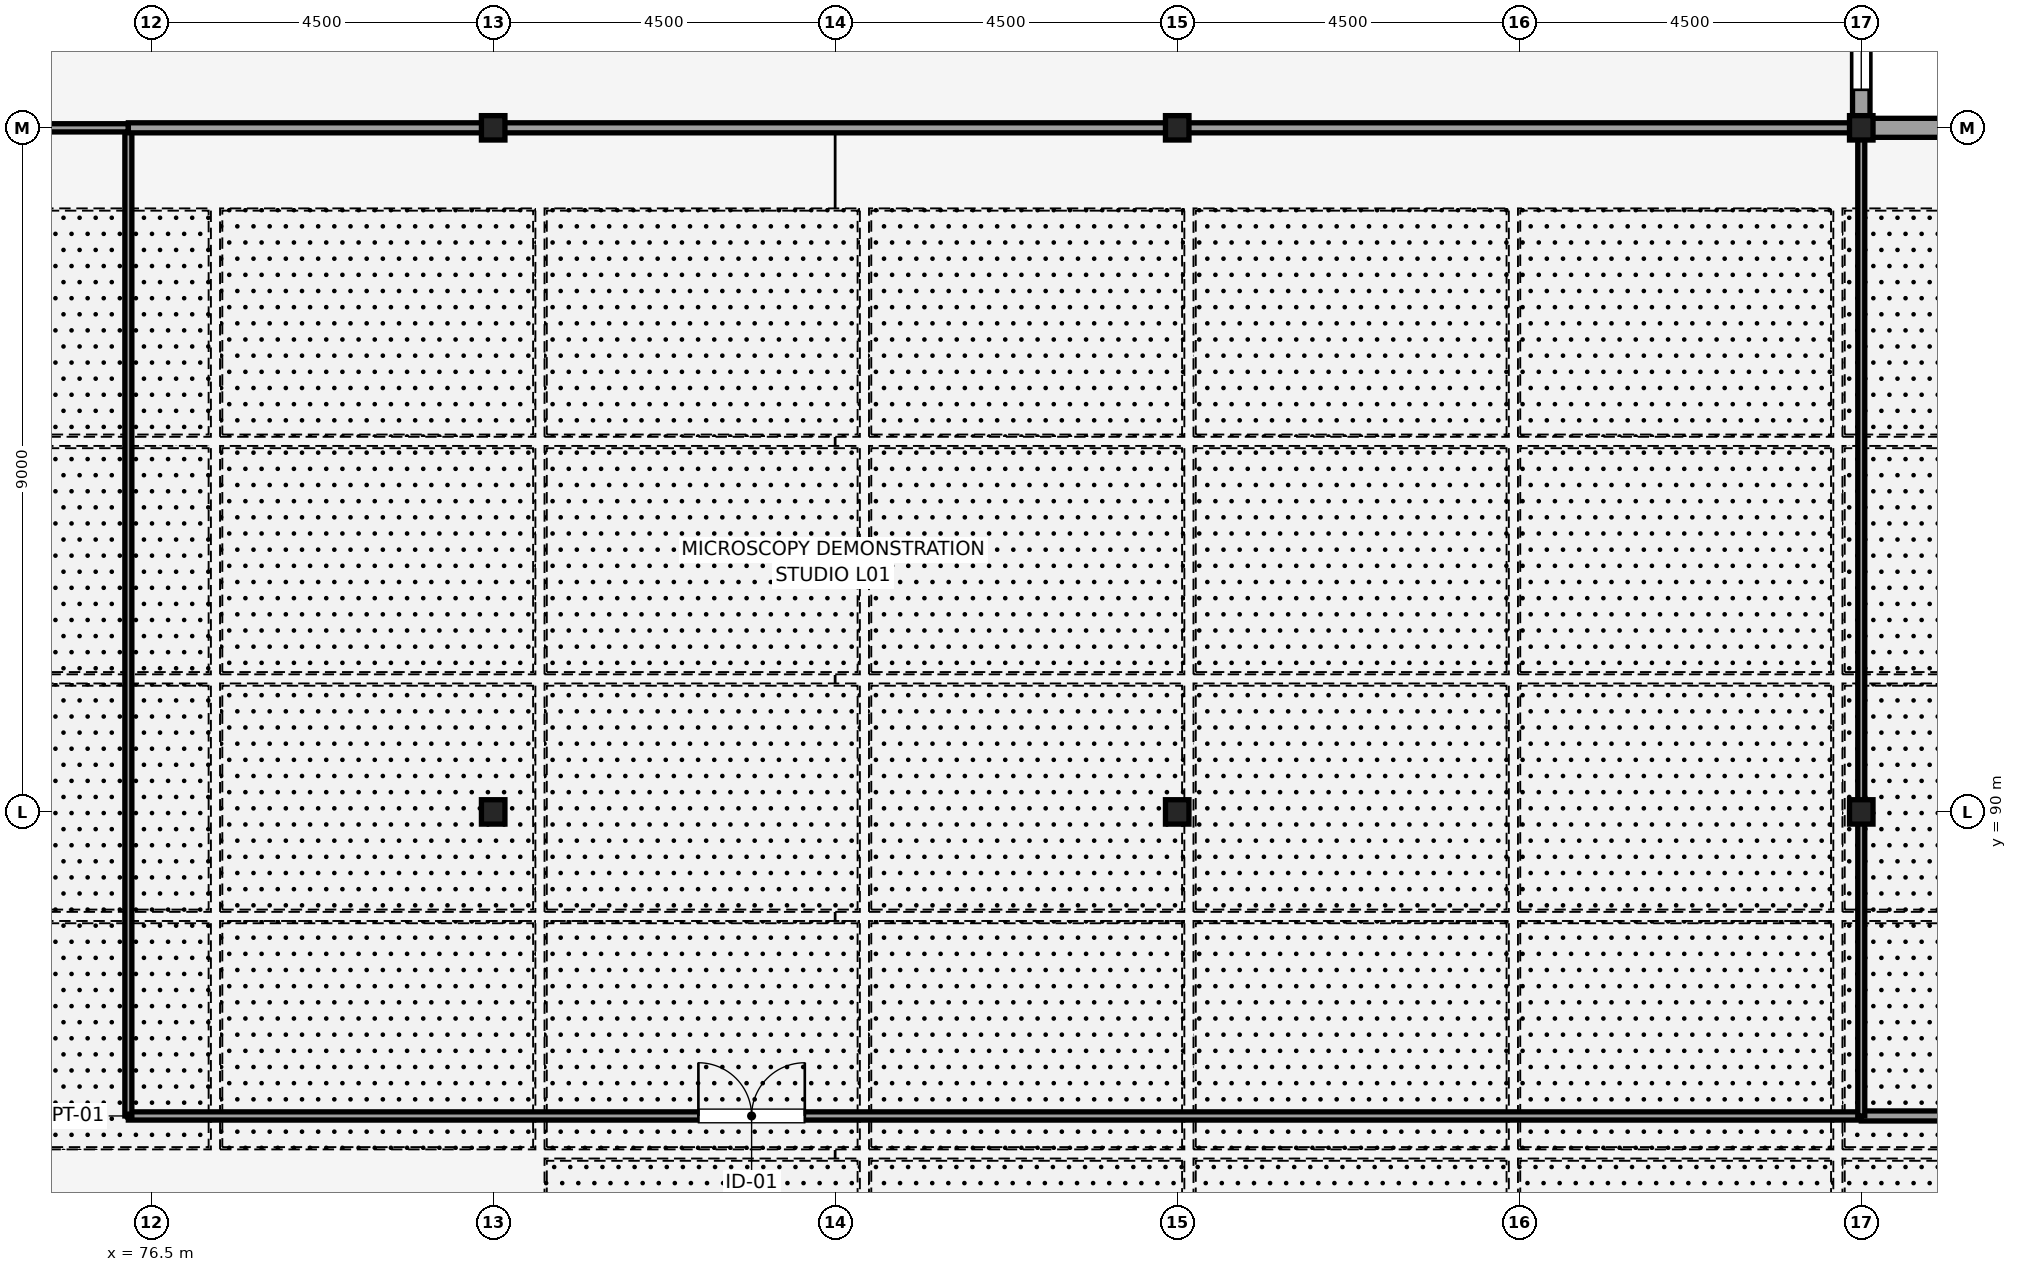
"""IFC4 building model, lengths in metres.
Left out: names, types, materials, properties, quantities, classifications, styles, units other than length and angle.
Written with IfcOpenShell. Run it as: python <this file> out.ifc"""

import sys

from ifc_helpers import new_model, si_unit, direction, frame, frame_2d, origin, origin_2d, place, context, subcontext, project, spatial, rectangle, i_section, extrude, element, fill, save


model = new_model("IFC4")
c1 = context("Model", 3, precision=1e-05, world=origin(), true_north=direction((0.0, 1.0)))
c2 = subcontext(c1, "Body", "Model", "MODEL_VIEW")
j1 = project(units=[si_unit("LENGTHUNIT", "METRE"), si_unit("PLANEANGLEUNIT", "RADIAN")], contexts=[c1])
p1 = place(None, origin())
s1 = spatial("IfcSite", under=j1, at=p1, CompositionType="ELEMENT")
p2 = place(p1, origin())
s2 = spatial("IfcBuilding", under=s1, at=p2, CompositionType="ELEMENT")
p3 = place(p2, frame((0.0, 0.0, 5.4)))
s3 = spatial("IfcBuildingStorey", under=s2, at=p3, CompositionType="ELEMENT", Elevation=5.4)
for number, where, z_axis, x_axis in (
    (1, (81.0, 90.0, 0.0), (0.0, 0.0, 1.0), (1.0, 0.0, 0.0)),
    (2, (81.0, 99.0, 0.0), (0.0, 0.0, 1.0), (1.0, 0.0, 0.0)),
    (3, (90.0, 90.0, 0.0), (0.0, 0.0, 1.0), (1.0, 0.0, 0.0)),
    (4, (90.0, 99.0, 0.0), (0.0, 0.0, 1.0), (1.0, 0.0, 0.0)),
    (5, (99.0, 90.0, 0.0), (0.0, 0.0, 1.0), (1.0, 0.0, 0.0)),
    (6, (99.0, 99.0, 0.0), (0.0, 0.0, 1.0), (1.0, 0.0, 0.0)),
):
    element("IfcColumn", number, at=place(p3, frame(where, z_axis=z_axis, x_axis=x_axis)), inside=s3, PredefinedType="COLUMN", context=c2, shape_type="SweptSolid", body=[
        extrude(i_section(OverallWidth=0.309, OverallDepth=0.321, WebThickness=0.014, FlangeThickness=0.022, FilletRadius=0.017, at=origin_2d()), origin(), (0.0, 0.0, 1.0), 4.5),
    ])
p4 = place(p3, frame((99.0, 99.0, 0.0), z_axis=(0.0, 0.0, 1.0), x_axis=(0.0, 1.0, 0.0)))
e7 = element("IfcWall", 7, at=p4, inside=s3, PredefinedType="STANDARD", context=c2, shape_type="SweptSolid", body=[
    extrude(rectangle(XDim=12.6, YDim=0.23, at=frame_2d((6.3, 0.0))), origin(), (0.0, 0.0, 1.0), 3.772),
])
p5 = place(p4, frame((2.0, 0.0, 1.0)))
e8 = element("IfcOpeningElement", 8, at=p5, cuts=e7, PredefinedType="OPENING", context=c2, shape_type="SweptSolid", body=[
    extrude(rectangle(XDim=2.4, YDim=1.5, at=frame_2d((1.2, 0.75))), frame((0.0, 0.125, 0.0), z_axis=(0.0, -1.0, 0.0), x_axis=(1.0, 0.0, 0.0)), (0.0, 0.0, 1.0), 0.25),
])
p6 = place(p4, frame((9.6, 0.0, 1.0)))
e9 = element("IfcOpeningElement", 9, at=p6, cuts=e7, PredefinedType="OPENING", context=c2, shape_type="SweptSolid", body=[
    extrude(rectangle(XDim=1.8, YDim=1.5, at=frame_2d((0.9, 0.75))), frame((0.0, 0.125, 0.0), z_axis=(0.0, -1.0, 0.0), x_axis=(1.0, 0.0, 0.0)), (0.0, 0.0, 1.0), 0.25),
])
p7 = place(p4, frame((5.2, 0.0, 1.0)))
e10 = element("IfcOpeningElement", 10, at=p7, cuts=e7, PredefinedType="OPENING", context=c2, shape_type="SweptSolid", body=[
    extrude(rectangle(XDim=1.2, YDim=1.5, at=frame_2d((0.6, 0.75))), frame((0.0, 0.125, 0.0), z_axis=(0.0, -1.0, 0.0), x_axis=(1.0, 0.0, 0.0)), (0.0, 0.0, 1.0), 0.25),
])
p8 = place(p4, frame((0.5, 0.0, 1.0)))
e11 = element("IfcOpeningElement", 11, at=p8, cuts=e7, PredefinedType="OPENING", context=c2, shape_type="SweptSolid", body=[
    extrude(rectangle(XDim=1.35, YDim=1.45, at=frame_2d((0.675, 0.725))), frame((0.0, 0.125, 0.0), z_axis=(0.0, -1.0, 0.0), x_axis=(1.0, 0.0, 0.0)), (0.0, 0.0, 1.0), 0.25),
])
p9 = place(p3, frame((112.5, 99.0, 0.0), z_axis=(0.0, 0.0, 1.0), x_axis=(-1.0, 0.0, 0.0)))
e12 = element("IfcWall", 12, at=p9, inside=s3, PredefinedType="STANDARD", context=c2, shape_type="SweptSolid", body=[
    extrude(rectangle(XDim=13.5, YDim=0.25, at=frame_2d((6.75, 0.0))), origin(), (0.0, 0.0, 1.0), 3.767),
])
p10 = place(p9, frame((1.35, 0.0, 1.0)))
e13 = element("IfcOpeningElement", 13, at=p10, cuts=e12, PredefinedType="OPENING", context=c2, shape_type="SweptSolid", body=[
    extrude(rectangle(XDim=1.8, YDim=1.5, at=frame_2d((0.9, 0.75))), frame((0.0, 0.135, 0.0), z_axis=(0.0, -1.0, 0.0), x_axis=(1.0, 0.0, 0.0)), (0.0, 0.0, 1.0), 0.27),
])
p11 = place(p9, frame((9.6, 0.0, 1.0)))
e14 = element("IfcOpeningElement", 14, at=p11, cuts=e12, PredefinedType="OPENING", context=c2, shape_type="SweptSolid", body=[
    extrude(rectangle(XDim=1.8, YDim=1.5, at=frame_2d((0.9, 0.75))), frame((0.0, 0.135, 0.0), z_axis=(0.0, -1.0, 0.0), x_axis=(1.0, 0.0, 0.0)), (0.0, 0.0, 1.0), 0.27),
])
p12 = place(p9, frame((5.6, 0.0, 0.6)))
e15 = element("IfcOpeningElement", 15, at=p12, cuts=e12, PredefinedType="OPENING", context=c2, shape_type="SweptSolid", body=[
    extrude(rectangle(XDim=3.0, YDim=2.4, at=frame_2d((1.5, 1.2))), frame((0.0, 0.135, 0.0), z_axis=(0.0, -1.0, 0.0), x_axis=(1.0, 0.0, 0.0)), (0.0, 0.0, 1.0), 0.27),
])
p13 = place(p3, frame((76.2, 86.0, 0.0), z_axis=(0.0, 0.0, 1.0), x_axis=(1.0, 0.0, 0.0)))
e16 = element("IfcWall", 16, at=p13, inside=s3, PredefinedType="PARTITIONING", context=c2, shape_type="SweptSolid", body=[
    extrude(rectangle(XDim=22.8, YDim=0.108, at=frame_2d((11.4, 0.0))), origin(), (0.0, 0.0, 1.0), 4.32),
])
p14 = place(p13, frame((7.5, 0.0, 0.0)))
e17 = element("IfcOpeningElement", 17, at=p14, cuts=e16, PredefinedType="OPENING", context=c2, shape_type="SweptSolid", body=[
    extrude(rectangle(XDim=1.4, YDim=2.2, at=frame_2d((0.7, 1.1))), frame((0.0, 0.064, 0.0), z_axis=(0.0, -1.0, 0.0), x_axis=(1.0, 0.0, 0.0)), (0.0, 0.0, 1.0), 0.128),
])
p15 = place(p3, frame((99.0, 86.0, 0.0), z_axis=(0.0, 0.0, 1.0), x_axis=(1.0, 0.0, 0.0)))
e18 = element("IfcWall", 18, at=p15, inside=s3, PredefinedType="PARTITIONING", context=c2, shape_type="SweptSolid", body=[
    extrude(rectangle(XDim=13.5, YDim=0.132, at=frame_2d((6.75, 0.0))), origin(), (0.0, 0.0, 1.0), 4.32),
])
p16 = place(p15, frame((5.2, 0.0, 0.0)))
e19 = element("IfcOpeningElement", 19, at=p16, cuts=e18, PredefinedType="OPENING", context=c2, shape_type="SweptSolid", body=[
    extrude(rectangle(XDim=0.95, YDim=2.15, at=frame_2d((0.475, 1.075))), frame((0.0, 0.076, 0.0), z_axis=(0.0, -1.0, 0.0), x_axis=(1.0, 0.0, 0.0)), (0.0, 0.0, 1.0), 0.152),
])
p17 = place(p3, frame((76.2, 86.0, 0.0), z_axis=(0.0, 0.0, 1.0), x_axis=(0.0, 1.0, 0.0)))
e20 = element("IfcWall", 20, at=p17, inside=s3, PredefinedType="PARTITIONING", context=c2, shape_type="SweptSolid", body=[
    extrude(rectangle(XDim=13.0, YDim=0.092, at=frame_2d((6.5, 0.0))), origin(), (0.0, 0.0, 1.0), 4.32),
])
p18 = place(p3, frame((99.0, 86.0, 0.0), z_axis=(0.0, 0.0, 1.0), x_axis=(0.0, 1.0, 0.0)))
e21 = element("IfcWall", 21, at=p18, inside=s3, PredefinedType="PARTITIONING", context=c2, shape_type="SweptSolid", body=[
    extrude(rectangle(XDim=13.0, YDim=0.092, at=frame_2d((6.5, 0.0))), origin(), (0.0, 0.0, 1.0), 3.772),
])
p19 = place(p3, frame((72.0, 99.0, 0.0), z_axis=(0.0, 0.0, 1.0), x_axis=(1.0, 0.0, 0.0)))
e22 = element("IfcWall", 22, at=p19, inside=s3, PredefinedType="PARTITIONING", context=c2, shape_type="SweptSolid", body=[
    extrude(rectangle(XDim=4.2, YDim=0.108, at=frame_2d((2.1, 0.0))), origin(), (0.0, 0.0, 1.0), 3.767),
])
p20 = place(p19, frame((1.1, 0.0, 0.0)))
e23 = element("IfcOpeningElement", 23, at=p20, cuts=e22, PredefinedType="OPENING", context=c2, shape_type="SweptSolid", body=[
    extrude(rectangle(XDim=2.0, YDim=2.4, at=frame_2d((1.0, 1.2))), frame((0.0, 0.064, 0.0), z_axis=(0.0, -1.0, 0.0), x_axis=(1.0, 0.0, 0.0)), (0.0, 0.0, 1.0), 0.128),
])
p21 = place(p3, frame((76.2, 99.0, 0.0), z_axis=(0.0, 0.0, 1.0), x_axis=(1.0, 0.0, 0.0)))
e24 = element("IfcWall", 24, at=p21, inside=s3, PredefinedType="PARTITIONING", context=c2, shape_type="SweptSolid", body=[
    extrude(rectangle(XDim=22.8, YDim=0.132, at=frame_2d((11.4, 0.0))), origin(), (0.0, 0.0, 1.0), 3.767),
])
p22 = place(p8, origin())
e25 = element("IfcWindow", 25, at=p22, inside=s3, PartitioningType="SINGLE_PANEL", PredefinedType="WINDOW", context=c2, shape_type="SweptSolid", body=[
    extrude(rectangle(XDim=1.35, YDim=1.45, at=frame_2d((0.675, 0.725))), frame((0.0, 0.03, 0.0), z_axis=(0.0, -1.0, 0.0), x_axis=(1.0, 0.0, 0.0)), (0.0, 0.0, 1.0), 0.06),
])
fill(e11, e25)
p23 = place(p14, origin())
e26 = element("IfcDoor", 26, at=p23, inside=s3, OperationType="DOUBLE_DOOR_SINGLE_SWING", PredefinedType="DOOR", context=c2, shape_type="SweptSolid", body=[
    extrude(rectangle(XDim=1.4, YDim=2.2, at=frame_2d((0.7, 1.1))), frame((0.0, 0.025, 0.0), z_axis=(0.0, -1.0, 0.0), x_axis=(1.0, 0.0, 0.0)), (0.0, 0.0, 1.0), 0.05),
])
fill(e17, e26)
save(model, sys.argv[1])
